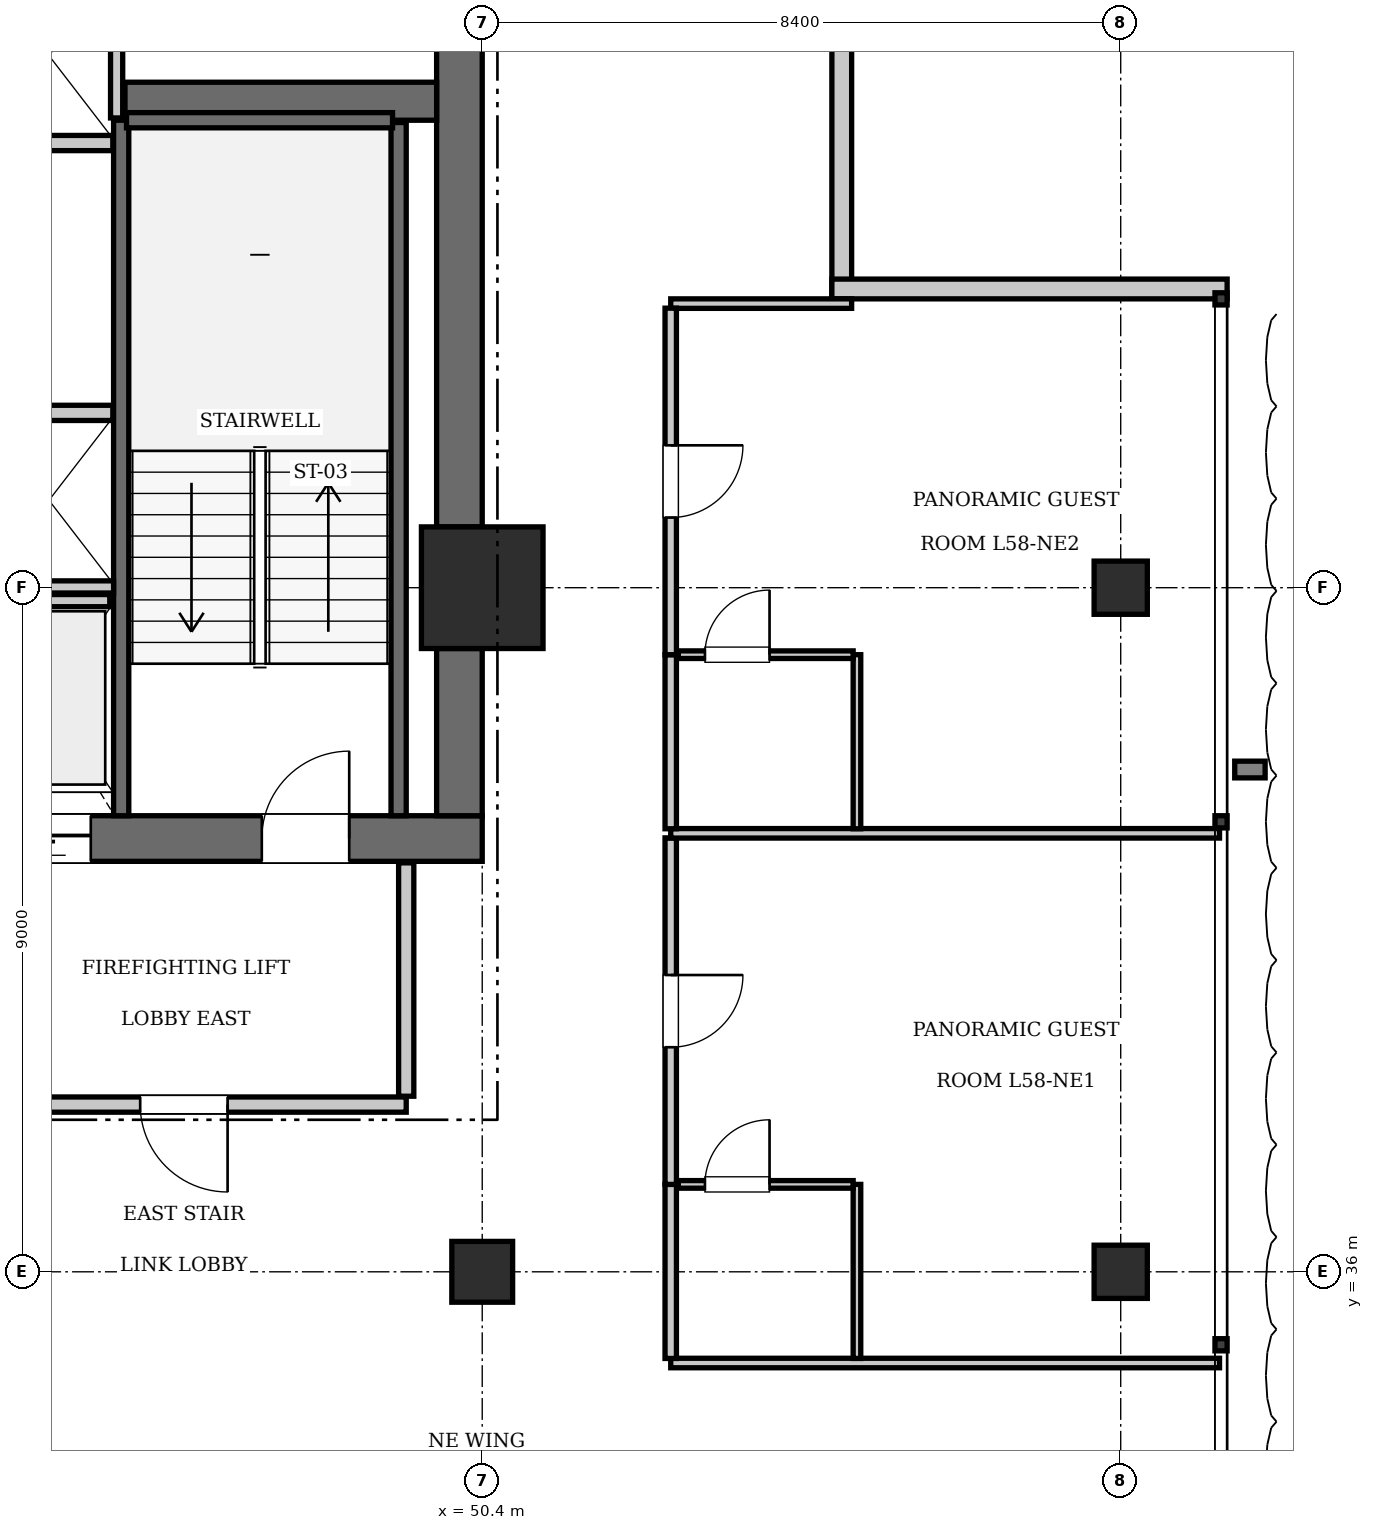
"""IFC4 building model, lengths in metres.
Left out: names, types, materials, properties, quantities, classifications, styles, units other than length and angle.
Written with IfcOpenShell. Run it as: python <this file> out.ifc"""

import sys

from ifc_helpers import new_model, si_unit, direction, frame, frame_2d, origin, origin_2d, place, context, subcontext, project, spatial, rectangle, extrude, element, fill, save


model = new_model("IFC4")
c1 = context("Model", 3, precision=1e-05, world=origin(), true_north=direction((0.0, 1.0)))
c2 = subcontext(c1, "Body", "Model", "MODEL_VIEW")
j1 = project(units=[si_unit("LENGTHUNIT", "METRE"), si_unit("PLANEANGLEUNIT", "RADIAN")], contexts=[c1])
p1 = place(None, origin())
s1 = spatial("IfcSite", under=j1, at=p1, CompositionType="ELEMENT")
p2 = place(p1, origin())
s2 = spatial("IfcBuilding", under=s1, at=p2, CompositionType="ELEMENT")
p3 = place(p2, frame((0.0, 0.0, 239.4)))
s3 = spatial("IfcBuildingStorey", under=s2, at=p3, CompositionType="ELEMENT", Elevation=239.4)
p4 = place(p3, frame((50.4, 45.0, 0.0), z_axis=(0.0, 0.0, 1.0), x_axis=(1.0, 0.0, 0.0)))
e1 = element("IfcColumn", 1, at=p4, inside=s3, PredefinedType="COLUMN", context=c2, shape_type="SweptSolid", body=[
    extrude(rectangle(XDim=1.6, YDim=1.6, at=origin_2d()), origin(), (0.0, 0.0, 1.0), 3.85),
])
p5 = place(p3, frame((43.6, 41.7, 0.0), z_axis=(0.0, 0.0, 1.0), x_axis=(1.0, 0.0, 0.0)))
e2 = element("IfcWall", 2, at=p5, inside=s3, PredefinedType="SHEAR", context=c2, shape_type="SweptSolid", body=[
    extrude(rectangle(XDim=6.8, YDim=0.6, at=frame_2d((3.4, 0.0))), origin(), (0.0, 0.0, 1.0), 3.85),
])
p6 = place(p5, frame((3.9, 0.0, 0.0)))
e3 = element("IfcOpeningElement", 3, at=p6, cuts=e2, PredefinedType="OPENING", context=c2, shape_type="SweptSolid", body=[
    extrude(rectangle(XDim=1.15, YDim=2.15, at=frame_2d((0.575, 1.075))), frame((0.0, 0.31, 0.0), z_axis=(0.0, -1.0, 0.0), x_axis=(1.0, 0.0, 0.0)), (0.0, 0.0, 1.0), 0.62),
])
p7 = place(p5, frame((0.55, 0.0, 0.0)))
e4 = element("IfcOpeningElement", 4, at=p7, cuts=e2, PredefinedType="OPENING", context=c2, shape_type="SweptSolid", body=[
    extrude(rectangle(XDim=1.1, YDim=2.2, at=frame_2d((0.55, 1.1))), frame((0.0, 0.31, 0.0), z_axis=(0.0, -1.0, 0.0), x_axis=(1.0, 0.0, 0.0)), (0.0, 0.0, 1.0), 0.62),
])
p8 = place(p3, frame((50.1, 42.0, 0.0), z_axis=(0.0, 0.0, 1.0), x_axis=(0.0, 1.0, 0.0)))
e5 = element("IfcWall", 5, at=p8, inside=s3, PredefinedType="SHEAR", context=c2, shape_type="SweptSolid", body=[
    extrude(rectangle(XDim=2.2, YDim=0.6, at=frame_2d((1.1, 0.0))), origin(), (0.0, 0.0, 1.0), 3.85),
])
p9 = place(p3, frame((50.1, 45.8, 0.0), z_axis=(0.0, 0.0, 1.0), x_axis=(0.0, 1.0, 0.0)))
e6 = element("IfcWall", 6, at=p9, inside=s3, PredefinedType="SHEAR", context=c2, shape_type="SweptSolid", body=[
    extrude(rectangle(XDim=7.6, YDim=0.6, at=frame_2d((3.8, 0.0))), origin(), (0.0, 0.0, 1.0), 3.85),
])
p10 = place(p3, frame((45.7, 51.4, 0.0), z_axis=(0.0, 0.0, 1.0), x_axis=(1.0, 0.0, 0.0)))
e7 = element("IfcWall", 7, at=p10, inside=s3, PredefinedType="SHEAR", context=c2, shape_type="SweptSolid", body=[
    extrude(rectangle(XDim=4.1, YDim=0.5, at=frame_2d((2.05, 0.0))), origin(), (0.0, 0.0, 1.0), 3.85),
])
p11 = place(p3, frame((50.4, 36.0, 0.0), z_axis=(0.0, 0.0, 1.0), x_axis=(1.0, 0.0, 0.0)))
e8 = element("IfcColumn", 8, at=p11, inside=s3, PredefinedType="COLUMN", context=c2, shape_type="SweptSolid", body=[
    extrude(rectangle(XDim=0.8, YDim=0.8, at=origin_2d()), origin(), (0.0, 0.0, 1.0), 3.85),
])
for number, where, z_axis, x_axis in (
    (9, (58.8, 36.0, 0.0), (0.0, 0.0, 1.0), (1.0, 0.0, 0.0)),
    (10, (58.8, 45.0, 0.0), (0.0, 0.0, 1.0), (1.0, 0.0, 0.0)),
):
    element("IfcColumn", number, at=place(p3, frame(where, z_axis=z_axis, x_axis=x_axis)), inside=s3, PredefinedType="COLUMN", context=c2, shape_type="SweptSolid", body=[
        extrude(rectangle(XDim=0.7, YDim=0.7, at=origin_2d()), origin(), (0.0, 0.0, 1.0), 3.85),
    ])
p12 = place(p3, frame((45.65, 42.0, 0.0), z_axis=(0.0, 0.0, 1.0), x_axis=(0.0, 1.0, 0.0)))
e11 = element("IfcWall", 11, at=p12, inside=s3, PredefinedType="SOLIDWALL", context=c2, shape_type="SweptSolid", body=[
    extrude(rectangle(XDim=9.15, YDim=0.2, at=frame_2d((4.575, 0.0))), origin(), (0.0, 0.0, 1.0), 3.61),
])
p13 = place(p3, frame((49.3, 42.0, 0.0), z_axis=(0.0, 0.0, 1.0), x_axis=(0.0, 1.0, 0.0)))
e12 = element("IfcWall", 12, at=p13, inside=s3, PredefinedType="SOLIDWALL", context=c2, shape_type="SweptSolid", body=[
    extrude(rectangle(XDim=9.12, YDim=0.2, at=frame_2d((4.56, 0.0))), origin(), (0.0, 0.0, 1.0), 3.61),
])
p14 = place(p3, frame((45.72, 51.15, 0.0), z_axis=(0.0, 0.0, 1.0), x_axis=(1.0, 0.0, 0.0)))
e13 = element("IfcWall", 13, at=p14, inside=s3, PredefinedType="SOLIDWALL", context=c2, shape_type="SweptSolid", body=[
    extrude(rectangle(XDim=3.5, YDim=0.2, at=frame_2d((1.75, 0.0))), origin(), (0.0, 0.0, 1.0), 3.61),
])
for number, where, z_axis, x_axis in (
    (14, (43.86, 47.3, 0.0), (0.0, 0.0, 1.0), (1.0, 0.0, 0.0)),
    (15, (43.86, 50.85, 0.0), (0.0, 0.0, 1.0), (1.0, 0.0, 0.0)),
):
    element("IfcWall", number, at=place(p3, frame(where, z_axis=z_axis, x_axis=x_axis)), inside=s3, PredefinedType="SOLIDWALL", context=c2, shape_type="SweptSolid", body=[
        extrude(rectangle(XDim=1.68, YDim=0.2, at=frame_2d((0.84, 0.0))), origin(), (0.0, 0.0, 1.0), 3.61),
    ])
p15 = place(p3, frame((43.9, 44.83, 0.0), z_axis=(0.0, 0.0, 1.0), x_axis=(1.0, 0.0, 0.0)))
e16 = element("IfcWall", 16, at=p15, inside=s3, PredefinedType="SOLIDWALL", context=c2, shape_type="SweptSolid", body=[
    extrude(rectangle(XDim=1.6, YDim=0.16, at=frame_2d((0.8, 0.0))), origin(), (0.0, 0.0, 1.0), 3.61),
])
p16 = place(p3, frame((42.1, 45.01, 0.0), z_axis=(0.0, 0.0, 1.0), x_axis=(1.0, 0.0, 0.0)))
e17 = element("IfcWall", 17, at=p16, inside=s3, PredefinedType="SOLIDWALL", context=c2, shape_type="SweptSolid", body=[
    extrude(rectangle(XDim=3.45, YDim=0.16, at=frame_2d((1.725, 0.0))), origin(), (0.0, 0.0, 1.0), 3.61),
])
p17 = place(p3, frame((45.59, 51.18, 0.0), z_axis=(0.0, 0.0, 1.0), x_axis=(0.0, 1.0, 0.0)))
e18 = element("IfcWall", 18, at=p17, inside=s3, PredefinedType="SOLIDWALL", context=c2, shape_type="SweptSolid", body=[
    extrude(rectangle(XDim=2.22, YDim=0.16, at=frame_2d((1.11, 0.0))), origin(), (0.0, 0.0, 1.0), 3.61),
])
for number, where, z_axis, x_axis in (
    (19, (55.13, 54.0, 0.0), (0.0, 0.0, 1.0), (0.0, -1.0, 0.0)),
    (20, (55.0, 48.93, 0.0), (0.0, 0.0, 1.0), (1.0, 0.0, 0.0)),
):
    element("IfcWall", number, at=place(p3, frame(where, z_axis=z_axis, x_axis=x_axis)), inside=s3, PredefinedType="SOLIDWALL", context=c2, shape_type="SweptSolid", body=[
        extrude(rectangle(XDim=5.2, YDim=0.26, at=frame_2d((2.6, 0.0))), origin(), (0.0, 0.0, 1.0), 3.61),
    ])
p18 = place(p3, frame((43.6, 38.2, 0.0), z_axis=(0.0, 0.0, 1.0), x_axis=(1.0, 0.0, 0.0)))
e21 = element("IfcWall", 21, at=p18, inside=s3, PredefinedType="PARTITIONING", context=c2, shape_type="SweptSolid", body=[
    extrude(rectangle(XDim=5.8, YDim=0.2, at=frame_2d((2.9, 0.0))), origin(), (0.0, 0.0, 1.0), 3.61),
])
p19 = place(p18, frame((2.3, 0.0, 0.0)))
e22 = element("IfcOpeningElement", 22, at=p19, cuts=e21, PredefinedType="OPENING", context=c2, shape_type="SweptSolid", body=[
    extrude(rectangle(XDim=1.15, YDim=2.15, at=frame_2d((0.575, 1.075))), frame((0.0, 0.11, 0.0), z_axis=(0.0, -1.0, 0.0), x_axis=(1.0, 0.0, 0.0)), (0.0, 0.0, 1.0), 0.22),
])
p20 = place(p3, frame((49.4, 38.31, 0.0), z_axis=(0.0, 0.0, 1.0), x_axis=(0.0, 1.0, 0.0)))
e23 = element("IfcWall", 23, at=p20, inside=s3, PredefinedType="PARTITIONING", context=c2, shape_type="SweptSolid", body=[
    extrude(rectangle(XDim=3.07, YDim=0.2, at=frame_2d((1.535, 0.0))), origin(), (0.0, 0.0, 1.0), 3.61),
])
p21 = place(p3, frame((52.88, 34.8, 0.0), z_axis=(0.0, 0.0, 1.0), x_axis=(1.0, 0.0, 0.0)))
e24 = element("IfcWall", 24, at=p21, inside=s3, PredefinedType="PARTITIONING", context=c2, shape_type="SweptSolid", body=[
    extrude(rectangle(XDim=7.22, YDim=0.125, at=frame_2d((3.61, 0.0))), origin(), (0.0, 0.0, 1.0), 3.61),
])
p22 = place(p3, frame((52.88, 48.738, 0.0), z_axis=(0.0, 0.0, 1.0), x_axis=(1.0, 0.0, 0.0)))
e25 = element("IfcWall", 25, at=p22, inside=s3, PredefinedType="PARTITIONING", context=c2, shape_type="SweptSolid", body=[
    extrude(rectangle(XDim=2.38, YDim=0.125, at=frame_2d((1.19, 0.0))), origin(), (0.0, 0.0, 1.0), 3.61),
])
p23 = place(p3, frame((52.88, 34.86, 0.0), z_axis=(0.0, 0.0, 1.0), x_axis=(0.0, 1.0, 0.0)))
e26 = element("IfcWall", 26, at=p23, inside=s3, PredefinedType="PARTITIONING", context=c2, shape_type="SweptSolid", body=[
    extrude(rectangle(XDim=2.29, YDim=0.15, at=frame_2d((1.145, 0.0))), origin(), (0.0, 0.0, 1.0), 3.61),
])
p24 = place(p3, frame((52.88, 37.15, 0.0), z_axis=(0.0, 0.0, 1.0), x_axis=(0.0, 1.0, 0.0)))
e27 = element("IfcWall", 27, at=p24, inside=s3, PredefinedType="PARTITIONING", context=c2, shape_type="SweptSolid", body=[
    extrude(rectangle(XDim=4.559, YDim=0.15, at=frame_2d((2.279, 0.0))), origin(), (0.0, 0.0, 1.0), 3.61),
])
p25 = place(p24, frame((1.804, 0.0, 0.0)))
e28 = element("IfcOpeningElement", 28, at=p25, cuts=e27, PredefinedType="OPENING", context=c2, shape_type="SweptSolid", body=[
    extrude(rectangle(XDim=0.95, YDim=2.15, at=frame_2d((0.475, 1.075))), frame((0.0, 0.085, 0.0), z_axis=(0.0, -1.0, 0.0), x_axis=(1.0, 0.0, 0.0)), (0.0, 0.0, 1.0), 0.17),
])
p26 = place(p3, frame((55.33, 34.86, 0.0), z_axis=(0.0, 0.0, 1.0), x_axis=(0.0, 1.0, 0.0)))
e29 = element("IfcWall", 29, at=p26, inside=s3, PredefinedType="PARTITIONING", context=c2, shape_type="SweptSolid", body=[
    extrude(rectangle(XDim=2.29, YDim=0.1, at=frame_2d((1.145, 0.0))), origin(), (0.0, 0.0, 1.0), 3.61),
])
p27 = place(p3, frame((52.98, 37.15, 0.0), z_axis=(0.0, 0.0, 1.0), x_axis=(1.0, 0.0, 0.0)))
e30 = element("IfcWall", 30, at=p27, inside=s3, PredefinedType="PARTITIONING", context=c2, shape_type="SweptSolid", body=[
    extrude(rectangle(XDim=2.3, YDim=0.1, at=frame_2d((1.15, 0.0))), origin(), (0.0, 0.0, 1.0), 3.61),
])
p28 = place(p27, frame((0.35, 0.0, 0.0)))
e31 = element("IfcOpeningElement", 31, at=p28, cuts=e30, PredefinedType="OPENING", context=c2, shape_type="SweptSolid", body=[
    extrude(rectangle(XDim=0.85, YDim=2.1, at=frame_2d((0.425, 1.05))), frame((0.0, 0.06, 0.0), z_axis=(0.0, -1.0, 0.0), x_axis=(1.0, 0.0, 0.0)), (0.0, 0.0, 1.0), 0.12),
])
p29 = place(p3, frame((52.88, 41.769, 0.0), z_axis=(0.0, 0.0, 1.0), x_axis=(1.0, 0.0, 0.0)))
e32 = element("IfcWall", 32, at=p29, inside=s3, PredefinedType="PARTITIONING", context=c2, shape_type="SweptSolid", body=[
    extrude(rectangle(XDim=7.22, YDim=0.125, at=frame_2d((3.61, 0.0))), origin(), (0.0, 0.0, 1.0), 3.61),
])
p30 = place(p3, frame((52.88, 41.829, 0.0), z_axis=(0.0, 0.0, 1.0), x_axis=(0.0, 1.0, 0.0)))
e33 = element("IfcWall", 33, at=p30, inside=s3, PredefinedType="PARTITIONING", context=c2, shape_type="SweptSolid", body=[
    extrude(rectangle(XDim=2.29, YDim=0.15, at=frame_2d((1.145, 0.0))), origin(), (0.0, 0.0, 1.0), 3.61),
])
p31 = place(p3, frame((52.88, 44.119, 0.0), z_axis=(0.0, 0.0, 1.0), x_axis=(0.0, 1.0, 0.0)))
e34 = element("IfcWall", 34, at=p31, inside=s3, PredefinedType="PARTITIONING", context=c2, shape_type="SweptSolid", body=[
    extrude(rectangle(XDim=4.559, YDim=0.15, at=frame_2d((2.279, 0.0))), origin(), (0.0, 0.0, 1.0), 3.61),
])
p32 = place(p31, frame((1.804, 0.0, 0.0)))
e35 = element("IfcOpeningElement", 35, at=p32, cuts=e34, PredefinedType="OPENING", context=c2, shape_type="SweptSolid", body=[
    extrude(rectangle(XDim=0.95, YDim=2.15, at=frame_2d((0.475, 1.075))), frame((0.0, 0.085, 0.0), z_axis=(0.0, -1.0, 0.0), x_axis=(1.0, 0.0, 0.0)), (0.0, 0.0, 1.0), 0.17),
])
p33 = place(p3, frame((55.33, 41.829, 0.0), z_axis=(0.0, 0.0, 1.0), x_axis=(0.0, 1.0, 0.0)))
e36 = element("IfcWall", 36, at=p33, inside=s3, PredefinedType="PARTITIONING", context=c2, shape_type="SweptSolid", body=[
    extrude(rectangle(XDim=2.29, YDim=0.1, at=frame_2d((1.145, 0.0))), origin(), (0.0, 0.0, 1.0), 3.61),
])
p34 = place(p3, frame((52.98, 44.119, 0.0), z_axis=(0.0, 0.0, 1.0), x_axis=(1.0, 0.0, 0.0)))
e37 = element("IfcWall", 37, at=p34, inside=s3, PredefinedType="PARTITIONING", context=c2, shape_type="SweptSolid", body=[
    extrude(rectangle(XDim=2.3, YDim=0.1, at=frame_2d((1.15, 0.0))), origin(), (0.0, 0.0, 1.0), 3.61),
])
p35 = place(p34, frame((0.35, 0.0, 0.0)))
e38 = element("IfcOpeningElement", 38, at=p35, cuts=e37, PredefinedType="OPENING", context=c2, shape_type="SweptSolid", body=[
    extrude(rectangle(XDim=0.85, YDim=2.1, at=frame_2d((0.425, 1.05))), frame((0.0, 0.06, 0.0), z_axis=(0.0, -1.0, 0.0), x_axis=(1.0, 0.0, 0.0)), (0.0, 0.0, 1.0), 0.12),
])
p36 = place(p6, origin())
e39 = element("IfcDoor", 39, at=p36, inside=s3, OperationType="SINGLE_SWING_RIGHT", PredefinedType="DOOR", context=c2, shape_type="SweptSolid", body=[
    extrude(rectangle(XDim=1.15, YDim=2.15, at=frame_2d((0.575, 1.075))), frame((0.0, 0.025, 0.0), z_axis=(0.0, -1.0, 0.0), x_axis=(1.0, 0.0, 0.0)), (0.0, 0.0, 1.0), 0.05),
])
fill(e3, e39)
p37 = place(p7, frame((1.1, 0.0, 0.0), z_axis=(0.0, 0.0, 1.0), x_axis=(-1.0, 0.0, 0.0)))
e40 = element("IfcDoor", 40, at=p37, inside=s3, OperationType="SLIDING_TO_LEFT", PredefinedType="DOOR", context=c2, shape_type="SweptSolid", body=[
    extrude(rectangle(XDim=1.1, YDim=2.2, at=frame_2d((0.55, 1.1))), frame((0.0, 0.025, 0.0), z_axis=(0.0, -1.0, 0.0), x_axis=(1.0, 0.0, 0.0)), (0.0, 0.0, 1.0), 0.05),
])
fill(e4, e40)
p38 = place(p19, frame((1.15, 0.0, 0.0), z_axis=(0.0, 0.0, 1.0), x_axis=(-1.0, 0.0, 0.0)))
e41 = element("IfcDoor", 41, at=p38, inside=s3, OperationType="SINGLE_SWING_LEFT", PredefinedType="DOOR", context=c2, shape_type="SweptSolid", body=[
    extrude(rectangle(XDim=1.15, YDim=2.15, at=frame_2d((0.575, 1.075))), frame((0.0, 0.025, 0.0), z_axis=(0.0, -1.0, 0.0), x_axis=(1.0, 0.0, 0.0)), (0.0, 0.0, 1.0), 0.05),
])
fill(e22, e41)
p39 = place(p28, origin())
e42 = element("IfcDoor", 42, at=p39, inside=s3, OperationType="SINGLE_SWING_RIGHT", PredefinedType="DOOR", context=c2, shape_type="SweptSolid", body=[
    extrude(rectangle(XDim=0.85, YDim=2.1, at=frame_2d((0.425, 1.05))), frame((0.0, 0.025, 0.0), z_axis=(0.0, -1.0, 0.0), x_axis=(1.0, 0.0, 0.0)), (0.0, 0.0, 1.0), 0.05),
])
fill(e31, e42)
p40 = place(p25, frame((0.95, 0.0, 0.0), z_axis=(0.0, 0.0, 1.0), x_axis=(-1.0, 0.0, 0.0)))
e43 = element("IfcDoor", 43, at=p40, inside=s3, OperationType="SINGLE_SWING_LEFT", PredefinedType="DOOR", context=c2, shape_type="SweptSolid", body=[
    extrude(rectangle(XDim=0.95, YDim=2.15, at=frame_2d((0.475, 1.075))), frame((0.0, 0.025, 0.0), z_axis=(0.0, -1.0, 0.0), x_axis=(1.0, 0.0, 0.0)), (0.0, 0.0, 1.0), 0.05),
])
fill(e28, e43)
p41 = place(p35, origin())
e44 = element("IfcDoor", 44, at=p41, inside=s3, OperationType="SINGLE_SWING_RIGHT", PredefinedType="DOOR", context=c2, shape_type="SweptSolid", body=[
    extrude(rectangle(XDim=0.85, YDim=2.1, at=frame_2d((0.425, 1.05))), frame((0.0, 0.025, 0.0), z_axis=(0.0, -1.0, 0.0), x_axis=(1.0, 0.0, 0.0)), (0.0, 0.0, 1.0), 0.05),
])
fill(e38, e44)
p42 = place(p32, frame((0.95, 0.0, 0.0), z_axis=(0.0, 0.0, 1.0), x_axis=(-1.0, 0.0, 0.0)))
e45 = element("IfcDoor", 45, at=p42, inside=s3, OperationType="SINGLE_SWING_LEFT", PredefinedType="DOOR", context=c2, shape_type="SweptSolid", body=[
    extrude(rectangle(XDim=0.95, YDim=2.15, at=frame_2d((0.475, 1.075))), frame((0.0, 0.025, 0.0), z_axis=(0.0, -1.0, 0.0), x_axis=(1.0, 0.0, 0.0)), (0.0, 0.0, 1.0), 0.05),
])
fill(e35, e45)
save(model, sys.argv[1])
